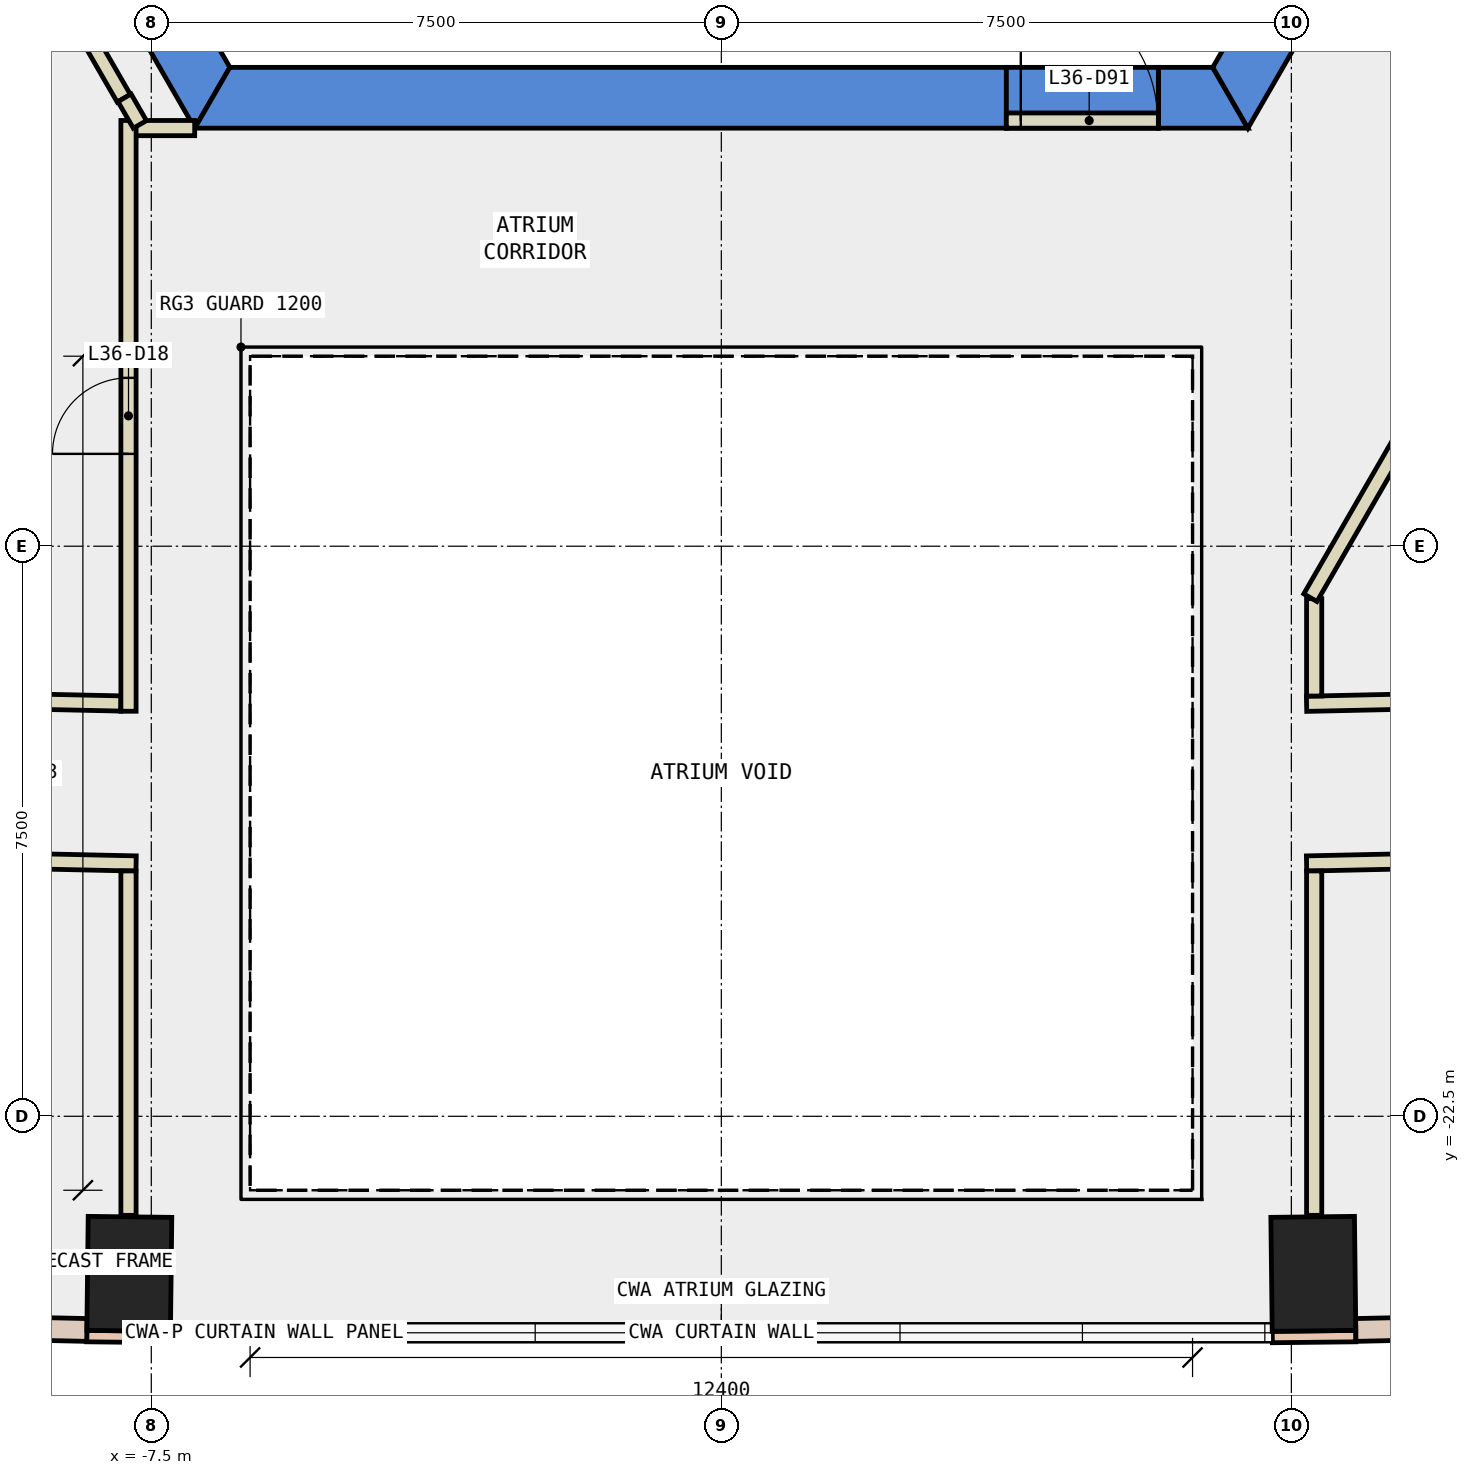
"""IFC4 building model, lengths in metres.
Left out: names, types, materials, properties, quantities, classifications, styles, units other than length and angle.
Written with IfcOpenShell. Run it as: python <this file> out.ifc"""

import sys

from ifc_helpers import new_model, si_unit, direction, frame, frame_2d, origin, origin_2d, place, context, subcontext, project, spatial, polyline, rectangle, outline, extrude, element, fill, save


model = new_model("IFC4")
c1 = context("Model", 3, precision=1e-05, world=origin(), true_north=direction((0.0, 1.0)))
c2 = subcontext(c1, "Body", "Model", "MODEL_VIEW")
j1 = project(units=[si_unit("LENGTHUNIT", "METRE"), si_unit("PLANEANGLEUNIT", "RADIAN")], contexts=[c1])
p1 = place(None, origin())
s1 = spatial("IfcSite", under=j1, at=p1, CompositionType="ELEMENT")
p2 = place(p1, origin())
s2 = spatial("IfcBuilding", under=s1, at=p2, CompositionType="ELEMENT")
p3 = place(p2, frame((0.0, 0.0, 163.4)))
s3 = spatial("IfcBuildingStorey", under=s2, at=p3, CompositionType="ELEMENT", Elevation=163.4)
for number, where, z_axis, x_axis in (
    (1, (-7.789, -24.573, -0.4), (0.0, 0.0, 1.0), (-1.0, 0.012, 0.0)),
    (2, (7.789, -24.573, -0.4), (0.0, 0.0, 1.0), (1.0, 0.012, 0.0)),
):
    element("IfcColumn", number, at=place(p3, frame(where, z_axis=z_axis, x_axis=x_axis)), inside=s3, PredefinedType="COLUMN", context=c2, shape_type="SweptSolid", body=[
        extrude(rectangle(XDim=1.1, YDim=1.5, at=origin_2d()), origin(), (0.0, 0.0, 1.0), 4.2),
    ])
p4 = place(p3, frame((0.0, 0.0, -0.4)))
e3 = element("IfcWall", 3, at=p4, inside=s3, PredefinedType="SHEAR", context=c2, shape_type="SweptSolid", body=[
    extrude(outline(polyline([(-13.856, 2.5), (-6.928, -9.5), (-6.466, -8.7), (-12.933, 2.5), (-13.856, 2.5)])), origin(), (0.0, 0.0, 1.0), 4.2),
])
p5 = place(p3, frame((0.0, 0.0, -0.4)))
e4 = element("IfcWall", 4, at=p5, inside=s3, PredefinedType="SHEAR", context=c2, shape_type="SweptSolid", body=[
    extrude(outline(polyline([(3.75, -9.5), (3.75, -8.7), (-6.466, -8.7), (-6.928, -9.5), (3.75, -9.5)])), origin(), (0.0, 0.0, 1.0), 4.2),
])
p6 = place(p3, frame((0.0, 0.0, -0.4)))
e5 = element("IfcWall", 5, at=p6, inside=s3, PredefinedType="SHEAR", context=c2, shape_type="SweptSolid", body=[
    extrude(outline(polyline([(5.75, -8.7), (5.75, -9.5), (6.928, -9.5), (6.466, -8.7), (5.75, -8.7)])), origin(), (0.0, 0.0, 1.0), 4.2),
])
p7 = place(p3, frame((0.0, 0.0, 3.6)))
e6 = element("IfcWall", 6, at=p7, inside=s3, PredefinedType="SHEAR", context=c2, shape_type="SweptSolid", body=[
    extrude(outline(polyline([(5.75, -9.5), (5.75, -8.7), (3.75, -8.7), (3.75, -9.5), (5.75, -9.5)])), origin(), (0.0, 0.0, 1.0), 0.2),
])
p8 = place(p3, frame((0.0, 0.0, -0.4)))
e7 = element("IfcWall", 7, at=p8, inside=s3, PredefinedType="SHEAR", context=c2, shape_type="SweptSolid", body=[
    extrude(outline(polyline([(8.117, -7.44), (7.424, -7.04), (6.466, -8.7), (6.928, -9.5), (8.117, -7.44)])), origin(), (0.0, 0.0, 1.0), 4.2),
])
for number, where, z_axis, x_axis in (
    (8, (-8.349, -25.392, 0.0), (0.0, 0.0, 1.0), (1.0, -0.011, 0.0)),
    (9, (7.249, -25.404, 0.0), (0.0, 0.0, 1.0), (1.0, 0.011, 0.0)),
):
    element("IfcWall", number, at=place(p3, frame(where, z_axis=z_axis, x_axis=x_axis)), inside=s3, PredefinedType="STANDARD", context=c2, shape_type="SweptSolid", body=[
        extrude(rectangle(XDim=1.1, YDim=0.15, at=frame_2d((0.55, 0.0))), origin(), (0.0, 0.0, 1.0), 3.8),
    ])
p9 = place(p3, frame((-15.68, -25.152, 0.0), z_axis=(0.0, 0.0, 1.0), x_axis=(0.999765201774, -0.021668902196, 0.0)))
e10 = element("IfcWall", 10, at=p9, inside=s3, PredefinedType="STANDARD", context=c2, shape_type="SweptSolid", body=[
    extrude(rectangle(XDim=7.335, YDim=0.3, at=frame_2d((3.667, 0.0))), origin(), (0.0, 0.0, 1.0), 3.8),
])
p10 = place(p9, frame((0.634, 0.0, 0.9)))
e11 = element("IfcOpeningElement", 11, at=p10, cuts=e10, PredefinedType="OPENING", context=c2, shape_type="SweptSolid", body=[
    extrude(rectangle(XDim=2.4, YDim=2.6, at=frame_2d((1.2, 1.3))), frame((0.0, 0.16, 0.0), z_axis=(0.0, -1.0, 0.0), x_axis=(1.0, 0.0, 0.0)), (0.0, 0.0, 1.0), 0.32),
])
p11 = place(p9, frame((4.301, 0.0, 0.9)))
e12 = element("IfcOpeningElement", 12, at=p11, cuts=e10, PredefinedType="OPENING", context=c2, shape_type="SweptSolid", body=[
    extrude(rectangle(XDim=2.4, YDim=2.6, at=frame_2d((1.2, 1.3))), frame((0.0, 0.16, 0.0), z_axis=(0.0, -1.0, 0.0), x_axis=(1.0, 0.0, 0.0)), (0.0, 0.0, 1.0), 0.32),
])
p12 = place(p3, frame((8.347, -25.311, 0.0), z_axis=(0.0, 0.0, 1.0), x_axis=(0.999765201774, 0.021668902196, 0.0)))
e13 = element("IfcWall", 13, at=p12, inside=s3, PredefinedType="STANDARD", context=c2, shape_type="SweptSolid", body=[
    extrude(rectangle(XDim=7.335, YDim=0.3, at=frame_2d((3.667, 0.0))), origin(), (0.0, 0.0, 1.0), 3.8),
])
p13 = place(p12, frame((0.634, 0.0, 0.9)))
e14 = element("IfcOpeningElement", 14, at=p13, cuts=e13, PredefinedType="OPENING", context=c2, shape_type="SweptSolid", body=[
    extrude(rectangle(XDim=2.4, YDim=2.6, at=frame_2d((1.2, 1.3))), frame((0.0, 0.16, 0.0), z_axis=(0.0, -1.0, 0.0), x_axis=(1.0, 0.0, 0.0)), (0.0, 0.0, 1.0), 0.32),
])
p14 = place(p12, frame((4.301, 0.0, 0.9)))
e15 = element("IfcOpeningElement", 15, at=p14, cuts=e13, PredefinedType="OPENING", context=c2, shape_type="SweptSolid", body=[
    extrude(rectangle(XDim=2.4, YDim=2.6, at=frame_2d((1.2, 1.3))), frame((0.0, 0.16, 0.0), z_axis=(0.0, -1.0, 0.0), x_axis=(1.0, 0.0, 0.0)), (0.0, 0.0, 1.0), 0.32),
])
p15 = place(p3, frame((7.7, -17.073, 0.0), z_axis=(0.0, 0.0, 1.0), x_axis=(0.999764372799, 0.021707115919, 0.0)))
e16 = element("IfcWall", 16, at=p15, inside=s3, PredefinedType="PARTITIONING", context=c2, shape_type="SweptSolid", body=[
    extrude(rectangle(XDim=8.289, YDim=0.2, at=frame_2d((4.145, 0.0))), origin(), (0.0, 0.0, 1.0), 3.8),
])
p16 = place(p15, frame((3.245, 0.0, 0.0)))
e17 = element("IfcOpeningElement", 17, at=p16, cuts=e16, PredefinedType="OPENING", context=c2, shape_type="SweptSolid", body=[
    extrude(rectangle(XDim=1.8, YDim=2.1, at=frame_2d((0.9, 1.05))), frame((0.0, 0.11, 0.0), z_axis=(0.0, -1.0, 0.0), x_axis=(1.0, 0.0, 0.0)), (0.0, 0.0, 1.0), 0.22),
])
p17 = place(p3, frame((-11.278, -16.996, 0.0), z_axis=(0.0, 0.0, 1.0), x_axis=(0.999766613119, -0.021603687022, 0.0)))
e18 = element("IfcWall", 18, at=p17, inside=s3, PredefinedType="PARTITIONING", context=c2, shape_type="SweptSolid", body=[
    extrude(rectangle(XDim=3.379, YDim=0.2, at=frame_2d((1.689, 0.0))), origin(), (0.0, 0.0, 1.0), 3.8),
])
p18 = place(p3, frame((16.049, -18.992, 0.0), z_axis=(0.0, 0.0, 1.0), x_axis=(-0.999762156504, -0.021808952826, 0.0)))
e19 = element("IfcWall", 19, at=p18, inside=s3, PredefinedType="PARTITIONING", context=c2, shape_type="SweptSolid", body=[
    extrude(rectangle(XDim=8.351, YDim=0.2, at=frame_2d((4.176, 0.0))), origin(), (0.0, 0.0, 1.0), 3.8),
])
p19 = place(p18, frame((3.675, 0.0, 0.0)))
e20 = element("IfcOpeningElement", 20, at=p19, cuts=e19, PredefinedType="OPENING", context=c2, shape_type="SweptSolid", body=[
    extrude(rectangle(XDim=1.0, YDim=2.1, at=frame_2d((0.5, 1.05))), frame((0.0, 0.11, 0.0), z_axis=(0.0, -1.0, 0.0), x_axis=(1.0, 0.0, 0.0)), (0.0, 0.0, 1.0), 0.22),
])
p20 = place(p3, frame((-7.7, -19.174, 0.0), z_axis=(0.0, 0.0, 1.0), x_axis=(-0.999762993889, 0.02177053169, 0.0)))
e21 = element("IfcWall", 21, at=p20, inside=s3, PredefinedType="PARTITIONING", context=c2, shape_type="SweptSolid", body=[
    extrude(rectangle(XDim=8.276, YDim=0.2, at=frame_2d((4.138, 0.0))), origin(), (0.0, 0.0, 1.0), 3.8),
])
p21 = place(p20, frame((3.713, 0.0, 0.0)))
e22 = element("IfcOpeningElement", 22, at=p21, cuts=e21, PredefinedType="OPENING", context=c2, shape_type="SweptSolid", body=[
    extrude(rectangle(XDim=1.0, YDim=2.1, at=frame_2d((0.5, 1.05))), frame((0.0, 0.11, 0.0), z_axis=(0.0, -1.0, 0.0), x_axis=(1.0, 0.0, 0.0)), (0.0, 0.0, 1.0), 0.22),
])
p22 = place(p3, frame((7.8, -15.69, 0.0), z_axis=(0.0, 0.0, 1.0), x_axis=(0.0, -1.0, 0.0)))
e23 = element("IfcWall", 23, at=p22, inside=s3, PredefinedType="PARTITIONING", context=c2, shape_type="SweptSolid", body=[
    extrude(rectangle(XDim=1.281, YDim=0.2, at=frame_2d((0.641, 0.0))), origin(), (0.0, 0.0, 1.0), 3.8),
])
p23 = place(p3, frame((-7.722, -9.499, 0.0), z_axis=(0.0, 0.0, 1.0), x_axis=(1.0, 0.0, 0.0)))
e24 = element("IfcWall", 24, at=p23, inside=s3, PredefinedType="PARTITIONING", context=c2, shape_type="SweptSolid", body=[
    extrude(rectangle(XDim=0.793, YDim=0.2, at=frame_2d((0.396, 0.0))), origin(), (0.0, 0.0, 1.0), 3.8),
])
p24 = place(p3, frame((-7.8, -17.171, 0.0), z_axis=(0.0, 0.0, 1.0), x_axis=(0.0, 1.0, 0.0)))
e25 = element("IfcWall", 25, at=p24, inside=s3, PredefinedType="PARTITIONING", context=c2, shape_type="SweptSolid", body=[
    extrude(rectangle(XDim=7.772, YDim=0.2, at=frame_2d((3.886, 0.0))), origin(), (0.0, 0.0, 1.0), 3.8),
])
p25 = place(p24, frame((3.386, 0.0, 0.0)))
e26 = element("IfcOpeningElement", 26, at=p25, cuts=e25, PredefinedType="OPENING", context=c2, shape_type="SweptSolid", body=[
    extrude(rectangle(XDim=1.0, YDim=2.1, at=frame_2d((0.5, 1.05))), frame((0.0, 0.11, 0.0), z_axis=(0.0, -1.0, 0.0), x_axis=(1.0, 0.0, 0.0)), (0.0, 0.0, 1.0), 0.22),
])
for number, where, z_axis, x_axis in (
    (27, (7.8, -19.272, 0.0), (0.0, 0.0, 1.0), (0.0, -1.0, 0.0)),
    (28, (-7.8, -23.803, 0.0), (0.0, 0.0, 1.0), (0.0, 1.0, 0.0)),
):
    element("IfcWall", number, at=place(p3, frame(where, z_axis=z_axis, x_axis=x_axis)), inside=s3, PredefinedType="PARTITIONING", context=c2, shape_type="SweptSolid", body=[
        extrude(rectangle(XDim=4.531, YDim=0.2, at=frame_2d((2.266, 0.0))), origin(), (0.0, 0.0, 1.0), 3.8),
    ])
p26 = place(p3, frame((-7.862, -9.107, 0.0), z_axis=(0.0, 0.0, 1.0), x_axis=(-0.499994038704, 0.866028845513, 0.0)))
e29 = element("IfcWall", 29, at=p26, inside=s3, PredefinedType="PARTITIONING", context=c2, shape_type="SweptSolid", body=[
    extrude(rectangle(XDim=2.568, YDim=0.2, at=frame_2d((1.284, 0.0))), origin(), (0.0, 0.0, 1.0), 3.8),
])
p27 = place(p3, frame((-7.65, -9.451, 0.0), z_axis=(0.0, 0.0, 1.0), x_axis=(-0.500297731093, 0.865853440406, 0.0)))
e30 = element("IfcWall", 30, at=p27, inside=s3, PredefinedType="PARTITIONING", context=c2, shape_type="SweptSolid", body=[
    extrude(rectangle(XDim=0.404, YDim=0.2, at=frame_2d((0.202, 0.0))), origin(), (0.0, 0.0, 1.0), 3.8),
])
p28 = place(p3, frame((3.75, -9.4, 0.0), z_axis=(0.0, 0.0, 1.0), x_axis=(1.0, 0.0, 0.0)))
e31 = element("IfcWall", 31, at=p28, inside=s3, PredefinedType="PARTITIONING", context=c2, shape_type="SweptSolid", body=[
    extrude(rectangle(XDim=2.0, YDim=0.2, at=frame_2d((1.0, 0.0))), origin(), (0.0, 0.0, 1.0), 2.4),
])
p29 = place(p28, frame((0.19, 0.0, 0.0)))
e32 = element("IfcOpeningElement", 32, at=p29, cuts=e31, PredefinedType="OPENING", context=c2, shape_type="SweptSolid", body=[
    extrude(rectangle(XDim=1.8, YDim=2.1, at=frame_2d((0.9, 1.05))), frame((0.0, 0.11, 0.0), z_axis=(0.0, -1.0, 0.0), x_axis=(1.0, 0.0, 0.0)), (0.0, 0.0, 1.0), 0.22),
])
p30 = place(p3, frame((12.401, -7.621, 0.0), z_axis=(0.0, 0.0, 1.0), x_axis=(-0.499983724212, -0.866034800411, 0.0)))
e33 = element("IfcWall", 33, at=p30, inside=s3, PredefinedType="PARTITIONING", context=c2, shape_type="SweptSolid", body=[
    extrude(rectangle(XDim=9.302, YDim=0.2, at=frame_2d((4.651, 0.0))), origin(), (0.0, 0.0, 1.0), 3.8),
])
p31 = place(p25, origin())
e34 = element("IfcDoor", 34, at=p31, inside=s3, OperationType="SINGLE_SWING_LEFT", PredefinedType="DOOR", context=c2, shape_type="SweptSolid", body=[
    extrude(rectangle(XDim=1.0, YDim=2.1, at=frame_2d((0.5, 1.05))), frame((0.0, 0.025, 0.0), z_axis=(0.0, -1.0, 0.0), x_axis=(1.0, 0.0, 0.0)), (0.0, 0.0, 1.0), 0.05),
])
fill(e26, e34)
p32 = place(p29, origin())
e35 = element("IfcDoor", 35, at=p32, inside=s3, OperationType="DOUBLE_DOOR_SINGLE_SWING", PredefinedType="DOOR", context=c2, shape_type="SweptSolid", body=[
    extrude(rectangle(XDim=1.8, YDim=2.1, at=frame_2d((0.9, 1.05))), frame((0.0, 0.025, 0.0), z_axis=(0.0, -1.0, 0.0), x_axis=(1.0, 0.0, 0.0)), (0.0, 0.0, 1.0), 0.05),
])
fill(e32, e35)
save(model, sys.argv[1])
